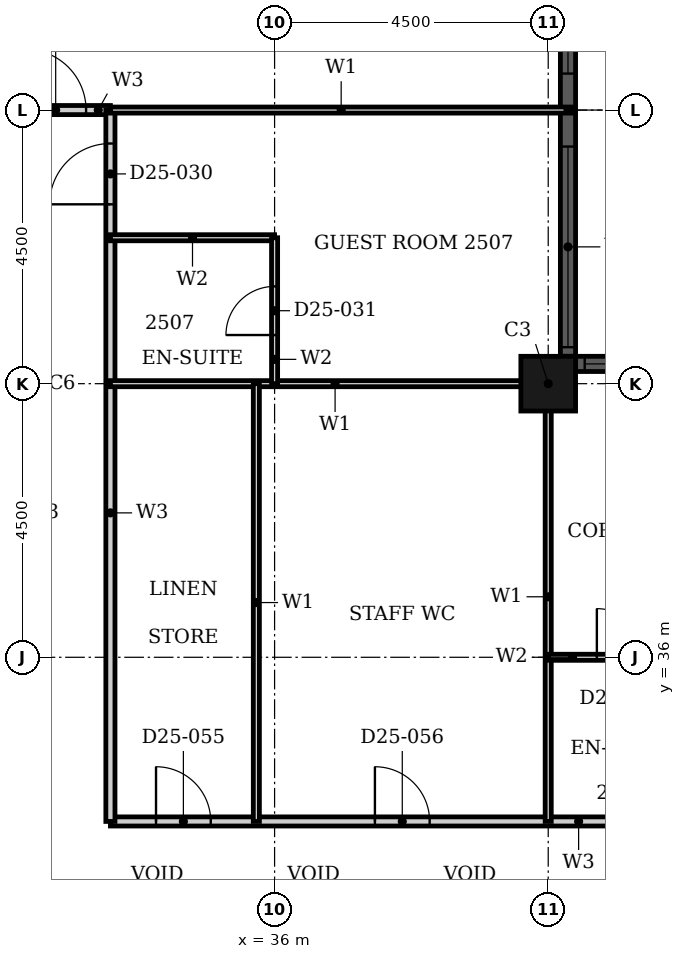
"""IFC4 building model, lengths in metres.
Left out: names, types, materials, properties, quantities, classifications, styles, units other than length and angle.
Written with IfcOpenShell. Run it as: python <this file> out.ifc"""

import sys

from ifc_helpers import new_model, si_unit, direction, frame, frame_2d, origin, origin_2d, place, context, subcontext, project, spatial, rectangle, hollow_rectangle, extrude, element, fill, save


model = new_model("IFC4")
c1 = context("Model", 3, precision=1e-05, world=origin(), true_north=direction((0.0, 1.0)))
c2 = subcontext(c1, "Body", "Model", "MODEL_VIEW")
j1 = project(units=[si_unit("LENGTHUNIT", "METRE"), si_unit("PLANEANGLEUNIT", "RADIAN")], contexts=[c1])
p1 = place(None, origin())
s1 = spatial("IfcSite", under=j1, at=p1, CompositionType="ELEMENT")
p2 = place(p1, origin())
s2 = spatial("IfcBuilding", under=s1, at=p2, CompositionType="ELEMENT")
p3 = place(p2, frame((0.0, 0.0, 104.4)))
s3 = spatial("IfcBuildingStorey", under=s2, at=p3, CompositionType="ELEMENT", Elevation=104.4)
p4 = place(p3, frame((40.5, 40.5, 0.0), z_axis=(0.0, 0.0, 1.0), x_axis=(1.0, 0.0, 0.0)))
e1 = element("IfcColumn", 1, at=p4, inside=s3, PredefinedType="COLUMN", context=c2, shape_type="SweptSolid", body=[
    extrude(hollow_rectangle(XDim=0.9, YDim=0.9, WallThickness=0.028, at=origin_2d()), origin(), (0.0, 0.0, 1.0), 3.6),
])
p5 = place(p3, frame((44.55, 40.825, 0.0), z_axis=(0.0, 0.0, 1.0), x_axis=(-1.0, 0.0, 0.0)))
e2 = element("IfcWall", 2, at=p5, inside=s3, PredefinedType="SOLIDWALL", context=c2, shape_type="SweptSolid", body=[
    extrude(rectangle(XDim=3.6, YDim=0.25, at=frame_2d((1.8, 0.0))), origin(), (0.0, 0.0, 1.0), 3.6),
])
p6 = place(p5, frame((0.15, 0.0, 0.9)))
e3 = element("IfcOpeningElement", 3, at=p6, cuts=e2, PredefinedType="OPENING", context=c2, shape_type="SweptSolid", body=[
    extrude(rectangle(XDim=3.3, YDim=2.08, at=frame_2d((1.65, 1.04))), frame((0.0, 0.135, 0.0), z_axis=(0.0, -1.0, 0.0), x_axis=(1.0, 0.0, 0.0)), (0.0, 0.0, 1.0), 0.27),
])
p7 = place(p3, frame((40.825, 40.95, 0.0), z_axis=(0.0, 0.0, 1.0), x_axis=(0.0, 1.0, 0.0)))
e4 = element("IfcWall", 4, at=p7, inside=s3, PredefinedType="SOLIDWALL", context=c2, shape_type="SweptSolid", body=[
    extrude(rectangle(XDim=8.1, YDim=0.25, at=frame_2d((4.05, 0.0))), origin(), (0.0, 0.0, 1.0), 3.6),
])
p8 = place(p7, frame((0.15, 0.0, 0.9)))
e5 = element("IfcOpeningElement", 5, at=p8, cuts=e4, PredefinedType="OPENING", context=c2, shape_type="SweptSolid", body=[
    extrude(rectangle(XDim=3.3, YDim=2.08, at=frame_2d((1.65, 1.04))), frame((0.0, 0.135, 0.0), z_axis=(0.0, -1.0, 0.0), x_axis=(1.0, 0.0, 0.0)), (0.0, 0.0, 1.0), 0.27),
])
p9 = place(p7, frame((4.65, 0.0, 0.9)))
e6 = element("IfcOpeningElement", 6, at=p9, cuts=e4, PredefinedType="OPENING", context=c2, shape_type="SweptSolid", body=[
    extrude(rectangle(XDim=3.3, YDim=2.08, at=frame_2d((1.65, 1.04))), frame((0.0, 0.135, 0.0), z_axis=(0.0, -1.0, 0.0), x_axis=(1.0, 0.0, 0.0)), (0.0, 0.0, 1.0), 0.27),
])
p10 = place(p3, frame((33.3, 33.3, 0.0), z_axis=(0.0, 0.0, 1.0), x_axis=(1.0, 0.0, 0.0)))
e7 = element("IfcWall", 7, at=p10, inside=s3, PredefinedType="PARTITIONING", context=c2, shape_type="SweptSolid", body=[
    extrude(rectangle(XDim=13.5, YDim=0.15, at=frame_2d((6.75, 0.0))), origin(), (0.0, 0.0, 1.0), 3.3),
])
p11 = place(p10, frame((10.15, 0.0, 0.0)))
e8 = element("IfcOpeningElement", 8, at=p11, cuts=e7, PredefinedType="OPENING", context=c2, shape_type="SweptSolid", body=[
    extrude(rectangle(XDim=1.0, YDim=2.1, at=frame_2d((0.5, 1.05))), frame((0.0, 0.085, 0.0), z_axis=(0.0, -1.0, 0.0), x_axis=(1.0, 0.0, 0.0)), (0.0, 0.0, 1.0), 0.17),
])
p12 = place(p10, frame((0.75, 0.0, 0.0)))
e9 = element("IfcOpeningElement", 9, at=p12, cuts=e7, PredefinedType="OPENING", context=c2, shape_type="SweptSolid", body=[
    extrude(rectangle(XDim=0.9, YDim=2.1, at=frame_2d((0.45, 1.05))), frame((0.0, 0.085, 0.0), z_axis=(0.0, -1.0, 0.0), x_axis=(1.0, 0.0, 0.0)), (0.0, 0.0, 1.0), 0.17),
])
p13 = place(p10, frame((4.35, 0.0, 0.0)))
e10 = element("IfcOpeningElement", 10, at=p13, cuts=e7, PredefinedType="OPENING", context=c2, shape_type="SweptSolid", body=[
    extrude(rectangle(XDim=0.9, YDim=2.1, at=frame_2d((0.45, 1.05))), frame((0.0, 0.085, 0.0), z_axis=(0.0, -1.0, 0.0), x_axis=(1.0, 0.0, 0.0)), (0.0, 0.0, 1.0), 0.17),
])
p14 = place(p3, frame((31.5, 45.0, 0.0), z_axis=(0.0, 0.0, 1.0), x_axis=(1.0, 0.0, 0.0)))
e11 = element("IfcWall", 11, at=p14, inside=s3, PredefinedType="PARTITIONING", context=c2, shape_type="SweptSolid", body=[
    extrude(rectangle(XDim=1.8, YDim=0.15, at=frame_2d((0.9, 0.0))), origin(), (0.0, 0.0, 1.0), 3.3),
])
p15 = place(p14, frame((0.4, 0.0, 0.0)))
e12 = element("IfcOpeningElement", 12, at=p15, cuts=e11, PredefinedType="OPENING", context=c2, shape_type="SweptSolid", body=[
    extrude(rectangle(XDim=1.0, YDim=2.1, at=frame_2d((0.5, 1.05))), frame((0.0, 0.085, 0.0), z_axis=(0.0, -1.0, 0.0), x_axis=(1.0, 0.0, 0.0)), (0.0, 0.0, 1.0), 0.17),
])
p16 = place(p3, frame((33.3, 33.3, 0.0), z_axis=(0.0, 0.0, 1.0), x_axis=(0.0, 1.0, 0.0)))
e13 = element("IfcWall", 13, at=p16, inside=s3, PredefinedType="PARTITIONING", context=c2, shape_type="SweptSolid", body=[
    extrude(rectangle(XDim=11.7, YDim=0.15, at=frame_2d((5.85, 0.0))), origin(), (0.0, 0.0, 1.0), 3.3),
])
p17 = place(p16, frame((10.15, 0.0, 0.0)))
e14 = element("IfcOpeningElement", 14, at=p17, cuts=e13, PredefinedType="OPENING", context=c2, shape_type="SweptSolid", body=[
    extrude(rectangle(XDim=1.0, YDim=2.1, at=frame_2d((0.5, 1.05))), frame((0.0, 0.085, 0.0), z_axis=(0.0, -1.0, 0.0), x_axis=(1.0, 0.0, 0.0)), (0.0, 0.0, 1.0), 0.17),
])
p18 = place(p3, frame((33.3, 40.5, 0.0), z_axis=(0.0, 0.0, 1.0), x_axis=(1.0, 0.0, 0.0)))
e15 = element("IfcWall", 15, at=p18, inside=s3, PredefinedType="PARTITIONING", context=c2, shape_type="SweptSolid", body=[
    extrude(rectangle(XDim=7.39, YDim=0.1, at=frame_2d((3.695, 0.0))), origin(), (0.0, 0.0, 1.0), 2.38),
])
p19 = place(p3, frame((33.3, 45.0, 0.0), z_axis=(0.0, 0.0, 1.0), x_axis=(1.0, 0.0, 0.0)))
e16 = element("IfcWall", 16, at=p19, inside=s3, PredefinedType="PARTITIONING", context=c2, shape_type="SweptSolid", body=[
    extrude(rectangle(XDim=7.59, YDim=0.1, at=frame_2d((3.795, 0.0))), origin(), (0.0, 0.0, 1.0), 3.3),
])
p20 = place(p3, frame((35.7, 33.3, 0.0), z_axis=(0.0, 0.0, 1.0), x_axis=(0.0, 1.0, 0.0)))
e17 = element("IfcWall", 17, at=p20, inside=s3, PredefinedType="PARTITIONING", context=c2, shape_type="SweptSolid", body=[
    extrude(rectangle(XDim=7.2, YDim=0.1, at=frame_2d((3.6, 0.0))), origin(), (0.0, 0.0, 1.0), 3.3),
])
p21 = place(p3, frame((40.5, 33.3, 0.0), z_axis=(0.0, 0.0, 1.0), x_axis=(0.0, 1.0, 0.0)))
e18 = element("IfcWall", 18, at=p21, inside=s3, PredefinedType="PARTITIONING", context=c2, shape_type="SweptSolid", body=[
    extrude(rectangle(XDim=7.39, YDim=0.1, at=frame_2d((3.695, 0.0))), origin(), (0.0, 0.0, 1.0), 3.3),
])
p22 = place(p3, frame((40.5, 36.0, 0.0), z_axis=(0.0, 0.0, 1.0), x_axis=(1.0, 0.0, 0.0)))
e19 = element("IfcWall", 19, at=p22, inside=s3, PredefinedType="PARTITIONING", context=c2, shape_type="SweptSolid", body=[
    extrude(rectangle(XDim=2.4, YDim=0.1, at=frame_2d((1.2, 0.0))), origin(), (0.0, 0.0, 1.0), 3.3),
])
p23 = place(p22, frame((0.8, 0.0, 0.0)))
e20 = element("IfcOpeningElement", 20, at=p23, cuts=e19, PredefinedType="OPENING", context=c2, shape_type="SweptSolid", body=[
    extrude(rectangle(XDim=0.8, YDim=2.1, at=frame_2d((0.4, 1.05))), frame((0.0, 0.06, 0.0), z_axis=(0.0, -1.0, 0.0), x_axis=(1.0, 0.0, 0.0)), (0.0, 0.0, 1.0), 0.12),
])
p24 = place(p3, frame((33.3, 42.9, 0.0), z_axis=(0.0, 0.0, 1.0), x_axis=(1.0, 0.0, 0.0)))
e21 = element("IfcWall", 21, at=p24, inside=s3, PredefinedType="PARTITIONING", context=c2, shape_type="SweptSolid", body=[
    extrude(rectangle(XDim=2.7, YDim=0.1, at=frame_2d((1.35, 0.0))), origin(), (0.0, 0.0, 1.0), 3.3),
])
p25 = place(p3, frame((36.0, 40.5, 0.0), z_axis=(0.0, 0.0, 1.0), x_axis=(0.0, 1.0, 0.0)))
e22 = element("IfcWall", 22, at=p25, inside=s3, PredefinedType="PARTITIONING", context=c2, shape_type="SweptSolid", body=[
    extrude(rectangle(XDim=2.4, YDim=0.1, at=frame_2d((1.2, 0.0))), origin(), (0.0, 0.0, 1.0), 2.58),
])
p26 = place(p25, frame((0.8, 0.0, 0.0)))
e23 = element("IfcOpeningElement", 23, at=p26, cuts=e22, PredefinedType="OPENING", context=c2, shape_type="SweptSolid", body=[
    extrude(rectangle(XDim=0.8, YDim=2.1, at=frame_2d((0.4, 1.05))), frame((0.0, 0.06, 0.0), z_axis=(0.0, -1.0, 0.0), x_axis=(1.0, 0.0, 0.0)), (0.0, 0.0, 1.0), 0.12),
])
p27 = place(p6, origin())
e24 = element("IfcWindow", 24, at=p27, inside=s3, PartitioningType="SINGLE_PANEL", PredefinedType="WINDOW", context=c2, shape_type="SweptSolid", body=[
    extrude(rectangle(XDim=3.3, YDim=2.08, at=frame_2d((1.65, 1.04))), frame((0.0, 0.03, 0.0), z_axis=(0.0, -1.0, 0.0), x_axis=(1.0, 0.0, 0.0)), (0.0, 0.0, 1.0), 0.06),
])
fill(e3, e24)
p28 = place(p8, origin())
e25 = element("IfcWindow", 25, at=p28, inside=s3, PartitioningType="SINGLE_PANEL", PredefinedType="WINDOW", context=c2, shape_type="SweptSolid", body=[
    extrude(rectangle(XDim=3.3, YDim=2.08, at=frame_2d((1.65, 1.04))), frame((0.0, 0.03, 0.0), z_axis=(0.0, -1.0, 0.0), x_axis=(1.0, 0.0, 0.0)), (0.0, 0.0, 1.0), 0.06),
])
fill(e5, e25)
p29 = place(p9, origin())
e26 = element("IfcWindow", 26, at=p29, inside=s3, PartitioningType="SINGLE_PANEL", PredefinedType="WINDOW", context=c2, shape_type="SweptSolid", body=[
    extrude(rectangle(XDim=3.3, YDim=2.08, at=frame_2d((1.65, 1.04))), frame((0.0, 0.03, 0.0), z_axis=(0.0, -1.0, 0.0), x_axis=(1.0, 0.0, 0.0)), (0.0, 0.0, 1.0), 0.06),
])
fill(e6, e26)
p30 = place(p17, origin())
e27 = element("IfcDoor", 27, at=p30, inside=s3, OperationType="SINGLE_SWING_RIGHT", PredefinedType="DOOR", context=c2, shape_type="SweptSolid", body=[
    extrude(rectangle(XDim=1.0, YDim=2.1, at=frame_2d((0.5, 1.05))), frame((0.0, 0.025, 0.0), z_axis=(0.0, -1.0, 0.0), x_axis=(1.0, 0.0, 0.0)), (0.0, 0.0, 1.0), 0.05),
])
fill(e14, e27)
p31 = place(p26, origin())
e28 = element("IfcDoor", 28, at=p31, inside=s3, OperationType="SINGLE_SWING_LEFT", PredefinedType="DOOR", context=c2, shape_type="SweptSolid", body=[
    extrude(rectangle(XDim=0.8, YDim=2.1, at=frame_2d((0.4, 1.05))), frame((0.0, 0.025, 0.0), z_axis=(0.0, -1.0, 0.0), x_axis=(1.0, 0.0, 0.0)), (0.0, 0.0, 1.0), 0.05),
])
fill(e23, e28)
p32 = place(p15, origin())
e29 = element("IfcDoor", 29, at=p32, inside=s3, OperationType="SINGLE_SWING_RIGHT", PredefinedType="DOOR", context=c2, shape_type="SweptSolid", body=[
    extrude(rectangle(XDim=1.0, YDim=2.1, at=frame_2d((0.5, 1.05))), frame((0.0, 0.025, 0.0), z_axis=(0.0, -1.0, 0.0), x_axis=(1.0, 0.0, 0.0)), (0.0, 0.0, 1.0), 0.05),
])
fill(e12, e29)
p33 = place(p23, origin())
e30 = element("IfcDoor", 30, at=p33, inside=s3, OperationType="SINGLE_SWING_RIGHT", PredefinedType="DOOR", context=c2, shape_type="SweptSolid", body=[
    extrude(rectangle(XDim=0.8, YDim=2.1, at=frame_2d((0.4, 1.05))), frame((0.0, 0.025, 0.0), z_axis=(0.0, -1.0, 0.0), x_axis=(1.0, 0.0, 0.0)), (0.0, 0.0, 1.0), 0.05),
])
fill(e20, e30)
p34 = place(p12, origin())
e31 = element("IfcDoor", 31, at=p34, inside=s3, OperationType="SINGLE_SWING_LEFT", PredefinedType="DOOR", context=c2, shape_type="SweptSolid", body=[
    extrude(rectangle(XDim=0.9, YDim=2.1, at=frame_2d((0.45, 1.05))), frame((0.0, 0.025, 0.0), z_axis=(0.0, -1.0, 0.0), x_axis=(1.0, 0.0, 0.0)), (0.0, 0.0, 1.0), 0.05),
])
fill(e9, e31)
p35 = place(p13, origin())
e32 = element("IfcDoor", 32, at=p35, inside=s3, OperationType="SINGLE_SWING_RIGHT", PredefinedType="DOOR", context=c2, shape_type="SweptSolid", body=[
    extrude(rectangle(XDim=0.9, YDim=2.1, at=frame_2d((0.45, 1.05))), frame((0.0, 0.025, 0.0), z_axis=(0.0, -1.0, 0.0), x_axis=(1.0, 0.0, 0.0)), (0.0, 0.0, 1.0), 0.05),
])
fill(e10, e32)
save(model, sys.argv[1])
